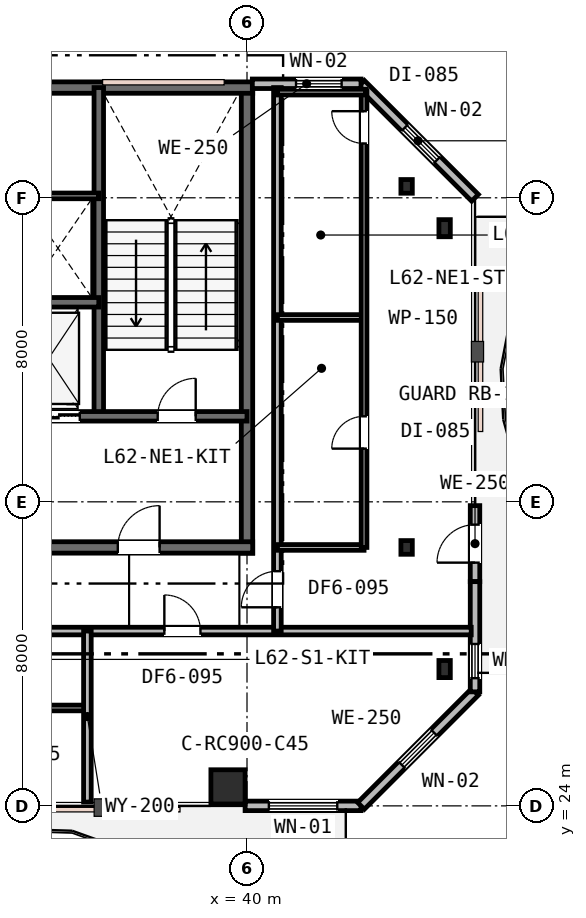
"""IFC4 building model, lengths in metres.
Left out: names, types, materials, properties, quantities, classifications, styles, units other than length and angle.
Written with IfcOpenShell. Run it as: python <this file> out.ifc"""

import sys

from ifc_helpers import new_model, si_unit, direction, frame, frame_2d, origin, origin_2d, place, context, subcontext, project, spatial, rectangle, i_section, extrude, element, fill, save


model = new_model("IFC4")
c1 = context("Model", 3, precision=1e-05, world=origin(), true_north=direction((0.0, 1.0)))
c2 = subcontext(c1, "Body", "Model", "MODEL_VIEW")
j1 = project(units=[si_unit("LENGTHUNIT", "METRE"), si_unit("PLANEANGLEUNIT", "RADIAN")], contexts=[c1])
p1 = place(None, origin())
s1 = spatial("IfcSite", under=j1, at=p1, CompositionType="ELEMENT")
p2 = place(p1, origin())
s2 = spatial("IfcBuilding", under=s1, at=p2, CompositionType="ELEMENT")
p3 = place(p2, frame((0.0, 0.0, 241.2)))
s3 = spatial("IfcBuildingStorey", under=s2, at=p3, CompositionType="ELEMENT", Elevation=241.2)
p4 = place(p3, frame((40.0, 30.65, 0.0), z_axis=(0.0, 0.0, 1.0), x_axis=(0.0, 1.0, 0.0)))
e1 = element("IfcWall", 1, at=p4, inside=s3, PredefinedType="SHEAR", context=c2, shape_type="SweptSolid", body=[
    extrude(rectangle(XDim=12.3, YDim=0.3, at=frame_2d((6.15, 0.0))), origin(), (0.0, 0.0, 1.0), 3.8),
])
p5 = place(p3, frame((15.85, 42.9, 0.0), z_axis=(0.0, 0.0, 1.0), x_axis=(1.0, 0.0, 0.0)))
e2 = element("IfcWall", 2, at=p5, inside=s3, PredefinedType="SHEAR", context=c2, shape_type="SweptSolid", body=[
    extrude(rectangle(XDim=24.3, YDim=0.3, at=frame_2d((12.15, 0.0))), origin(), (0.0, 0.0, 1.0), 3.8),
])
p6 = place(p3, frame((28.95, 30.8, 0.0), z_axis=(0.0, 0.0, 1.0), x_axis=(1.0, 0.0, 0.0)))
e3 = element("IfcWall", 3, at=p6, inside=s3, PredefinedType="SHEAR", context=c2, shape_type="SweptSolid", body=[
    extrude(rectangle(XDim=11.2, YDim=0.3, at=frame_2d((5.6, 0.0))), origin(), (0.0, 0.0, 1.0), 3.8),
])
p7 = place(p6, frame((7.65, 0.0, 0.0)))
e4 = element("IfcOpeningElement", 4, at=p7, cuts=e3, PredefinedType="OPENING", context=c2, shape_type="SweptSolid", body=[
    extrude(rectangle(XDim=1.1, YDim=2.15, at=frame_2d((0.55, 1.075))), frame((0.0, 0.16, 0.0), z_axis=(0.0, -1.0, 0.0), x_axis=(1.0, 0.0, 0.0)), (0.0, 0.0, 1.0), 0.32),
])
p8 = place(p3, frame((36.1, 34.25, 0.0), z_axis=(0.0, 0.0, 1.0), x_axis=(0.0, 1.0, 0.0)))
e5 = element("IfcWall", 5, at=p8, inside=s3, PredefinedType="SHEAR", context=c2, shape_type="SweptSolid", body=[
    extrude(rectangle(XDim=8.65, YDim=0.25, at=frame_2d((4.325, 0.0))), origin(), (0.0, 0.0, 1.0), 3.8),
])
p9 = place(p3, frame((33.95, 34.25, 0.0), z_axis=(0.0, 0.0, 1.0), x_axis=(1.0, 0.0, 0.0)))
e6 = element("IfcWall", 6, at=p9, inside=s3, PredefinedType="SHEAR", context=c2, shape_type="SweptSolid", body=[
    extrude(rectangle(XDim=6.05, YDim=0.25, at=frame_2d((3.025, 0.0))), origin(), (0.0, 0.0, 1.0), 3.8),
])
p10 = place(p9, frame((3.7, 0.0, 0.0)))
e7 = element("IfcOpeningElement", 7, at=p10, cuts=e6, PredefinedType="OPENING", context=c2, shape_type="SweptSolid", body=[
    extrude(rectangle(XDim=1.0, YDim=2.15, at=frame_2d((0.5, 1.075))), frame((0.0, 0.135, 0.0), z_axis=(0.0, -1.0, 0.0), x_axis=(1.0, 0.0, 0.0)), (0.0, 0.0, 1.0), 0.27),
])
p11 = place(p9, frame((0.55, 0.0, 0.0)))
e8 = element("IfcOpeningElement", 8, at=p11, cuts=e6, PredefinedType="OPENING", context=c2, shape_type="SweptSolid", body=[
    extrude(rectangle(XDim=1.1, YDim=2.15, at=frame_2d((0.55, 1.075))), frame((0.0, 0.135, 0.0), z_axis=(0.0, -1.0, 0.0), x_axis=(1.0, 0.0, 0.0)), (0.0, 0.0, 1.0), 0.27),
])
p12 = place(p3, frame((19.9, 37.25, 0.0), z_axis=(0.0, 0.0, 1.0), x_axis=(1.0, 0.0, 0.0)))
e9 = element("IfcWall", 9, at=p12, inside=s3, PredefinedType="SHEAR", context=c2, shape_type="SweptSolid", body=[
    extrude(rectangle(XDim=16.2, YDim=0.25, at=frame_2d((8.1, 0.0))), origin(), (0.0, 0.0, 1.0), 3.8),
])
p13 = place(p12, frame((12.55, 0.0, 0.0)))
e10 = element("IfcOpeningElement", 10, at=p13, cuts=e9, PredefinedType="OPENING", context=c2, shape_type="SweptSolid", body=[
    extrude(rectangle(XDim=0.9, YDim=2.15, at=frame_2d((0.45, 1.075))), frame((0.0, 0.135, 0.0), z_axis=(0.0, -1.0, 0.0), x_axis=(1.0, 0.0, 0.0)), (0.0, 0.0, 1.0), 0.27),
])
p14 = place(p12, frame((2.5, 0.0, 0.0)))
e11 = element("IfcOpeningElement", 11, at=p14, cuts=e9, PredefinedType="OPENING", context=c2, shape_type="SweptSolid", body=[
    extrude(rectangle(XDim=1.05, YDim=2.15, at=frame_2d((0.525, 1.075))), frame((0.0, 0.135, 0.0), z_axis=(0.0, -1.0, 0.0), x_axis=(1.0, 0.0, 0.0)), (0.0, 0.0, 1.0), 0.27),
])
p15 = place(p12, frame((4.4, 0.0, 0.0)))
e12 = element("IfcOpeningElement", 12, at=p15, cuts=e9, PredefinedType="OPENING", context=c2, shape_type="SweptSolid", body=[
    extrude(rectangle(XDim=1.05, YDim=2.15, at=frame_2d((0.525, 1.075))), frame((0.0, 0.135, 0.0), z_axis=(0.0, -1.0, 0.0), x_axis=(1.0, 0.0, 0.0)), (0.0, 0.0, 1.0), 0.27),
])
p16 = place(p12, frame((6.3, 0.0, 0.0)))
e13 = element("IfcOpeningElement", 13, at=p16, cuts=e9, PredefinedType="OPENING", context=c2, shape_type="SweptSolid", body=[
    extrude(rectangle(XDim=1.05, YDim=2.15, at=frame_2d((0.525, 1.075))), frame((0.0, 0.135, 0.0), z_axis=(0.0, -1.0, 0.0), x_axis=(1.0, 0.0, 0.0)), (0.0, 0.0, 1.0), 0.27),
])
p17 = place(p3, frame((39.5, 24.5, 0.0), z_axis=(0.0, 0.0, 1.0), x_axis=(1.0, 0.0, 0.0)))
e14 = element("IfcColumn", 14, at=p17, inside=s3, PredefinedType="COLUMN", context=c2, shape_type="SweptSolid", body=[
    extrude(rectangle(XDim=0.9, YDim=0.9, at=origin_2d()), origin(), (0.0, 0.0, 1.0), 3.8),
])
for number, where, z_axis, x_axis in (
    (15, (45.2, 27.6, 0.0), (0.0, 0.0, 1.0), (1.0, 0.0, 0.0)),
    (16, (45.2, 39.2, 0.0), (0.0, 0.0, 1.0), (1.0, 0.0, 0.0)),
):
    element("IfcColumn", number, at=place(p3, frame(where, z_axis=z_axis, x_axis=x_axis)), inside=s3, PredefinedType="COLUMN", context=c2, shape_type="SweptSolid", body=[
        extrude(i_section(OverallWidth=0.3, OverallDepth=0.45, WebThickness=0.014, FlangeThickness=0.026, FilletRadius=0.027, at=origin_2d()), origin(), (0.0, 0.0, 1.0), 3.8),
    ])
for number, where, z_axis, x_axis in (
    (17, (44.2, 30.8, 0.0), (0.0, 0.0, 1.0), (1.0, 0.0, 0.0)),
    (18, (44.2, 40.3, 0.0), (0.0, 0.0, 1.0), (1.0, 0.0, 0.0)),
):
    element("IfcColumn", number, at=place(p3, frame(where, z_axis=z_axis, x_axis=x_axis)), inside=s3, PredefinedType="COLUMN", context=c2, shape_type="SweptSolid", body=[
        extrude(i_section(OverallWidth=0.3, OverallDepth=0.36, WebThickness=0.013, FlangeThickness=0.022, FilletRadius=0.027, at=origin_2d()), origin(), (0.0, 0.0, 1.0), 3.8),
    ])
p18 = place(p3, frame((39.95, 24.0, 0.0), z_axis=(0.0, 0.0, 1.0), x_axis=(1.0, 0.0, 0.0)))
e19 = element("IfcWall", 19, at=p18, inside=s3, PredefinedType="STANDARD", context=c2, shape_type="SweptSolid", body=[
    extrude(rectangle(XDim=3.05, YDim=0.25, at=frame_2d((1.525, 0.0))), origin(), (0.0, 0.0, 1.0), 3.53),
])
p19 = place(p18, frame((0.625, 0.0, 0.75)))
e20 = element("IfcOpeningElement", 20, at=p19, cuts=e19, PredefinedType="OPENING", context=c2, shape_type="SweptSolid", body=[
    extrude(rectangle(XDim=1.8, YDim=1.85, at=frame_2d((0.9, 0.925))), frame((0.0, 0.135, 0.0), z_axis=(0.0, -1.0, 0.0), x_axis=(1.0, 0.0, 0.0)), (0.0, 0.0, 1.0), 0.27),
])
p20 = place(p3, frame((43.0, 24.0, 0.0), z_axis=(0.0, 0.0, 1.0), x_axis=(0.707106781187, 0.707106781187, 0.0)))
e21 = element("IfcWall", 21, at=p20, inside=s3, PredefinedType="STANDARD", context=c2, shape_type="SweptSolid", body=[
    extrude(rectangle(XDim=4.243, YDim=0.25, at=frame_2d((2.121, 0.0))), origin(), (0.0, 0.0, 1.0), 3.53),
])
p21 = place(p20, frame((1.521, 0.0, 0.85)))
e22 = element("IfcOpeningElement", 22, at=p21, cuts=e21, PredefinedType="OPENING", context=c2, shape_type="SweptSolid", body=[
    extrude(rectangle(XDim=1.2, YDim=1.6, at=frame_2d((0.6, 0.8))), frame((0.0, 0.135, 0.0), z_axis=(0.0, -1.0, 0.0), x_axis=(1.0, 0.0, 0.0)), (0.0, 0.0, 1.0), 0.27),
])
p22 = place(p3, frame((46.0, 29.9, 0.0), z_axis=(0.0, 0.0, 1.0), x_axis=(0.0, 1.0, 0.0)))
e23 = element("IfcWall", 23, at=p22, inside=s3, PredefinedType="STANDARD", context=c2, shape_type="SweptSolid", body=[
    extrude(rectangle(XDim=2.0, YDim=0.25, at=frame_2d((1.0, 0.0))), origin(), (0.0, 0.0, 1.0), 3.53),
])
p23 = place(p22, frame((0.5, 0.0, 0.0)))
e24 = element("IfcOpeningElement", 24, at=p23, cuts=e23, PredefinedType="OPENING", context=c2, shape_type="SweptSolid", body=[
    extrude(rectangle(XDim=1.0, YDim=2.15, at=frame_2d((0.5, 1.075))), frame((0.0, 0.135, 0.0), z_axis=(0.0, -1.0, 0.0), x_axis=(1.0, 0.0, 0.0)), (0.0, 0.0, 1.0), 0.27),
])
p24 = place(p3, frame((46.0, 27.0, 0.0), z_axis=(0.0, 0.0, 1.0), x_axis=(0.0, 1.0, 0.0)))
e25 = element("IfcWall", 25, at=p24, inside=s3, PredefinedType="STANDARD", context=c2, shape_type="SweptSolid", body=[
    extrude(rectangle(XDim=2.9, YDim=0.25, at=frame_2d((1.45, 0.0))), origin(), (0.0, 0.0, 1.0), 3.53),
])
p25 = place(p24, frame((0.36, 0.0, 0.9)))
e26 = element("IfcOpeningElement", 26, at=p25, cuts=e25, PredefinedType="OPENING", context=c2, shape_type="SweptSolid", body=[
    extrude(rectangle(XDim=0.9, YDim=1.55, at=frame_2d((0.45, 0.775))), frame((0.0, 0.135, 0.0), z_axis=(0.0, -1.0, 0.0), x_axis=(1.0, 0.0, 0.0)), (0.0, 0.0, 1.0), 0.27),
])
p26 = place(p3, frame((46.0, 40.0, 0.0), z_axis=(0.0, 0.0, 1.0), x_axis=(-0.707106781187, 0.707106781187, 0.0)))
e27 = element("IfcWall", 27, at=p26, inside=s3, PredefinedType="STANDARD", context=c2, shape_type="SweptSolid", body=[
    extrude(rectangle(XDim=4.243, YDim=0.25, at=frame_2d((2.121, 0.0))), origin(), (0.0, 0.0, 1.0), 3.53),
])
p27 = place(p26, frame((1.411, 0.0, 0.85)))
e28 = element("IfcOpeningElement", 28, at=p27, cuts=e27, PredefinedType="OPENING", context=c2, shape_type="SweptSolid", body=[
    extrude(rectangle(XDim=1.2, YDim=1.6, at=frame_2d((0.6, 0.8))), frame((0.0, 0.135, 0.0), z_axis=(0.0, -1.0, 0.0), x_axis=(1.0, 0.0, 0.0)), (0.0, 0.0, 1.0), 0.27),
])
p28 = place(p3, frame((43.0, 43.0, 0.0), z_axis=(0.0, 0.0, 1.0), x_axis=(-1.0, 0.0, 0.0)))
e29 = element("IfcWall", 29, at=p28, inside=s3, PredefinedType="STANDARD", context=c2, shape_type="SweptSolid", body=[
    extrude(rectangle(XDim=2.86, YDim=0.25, at=frame_2d((1.43, 0.0))), origin(), (0.0, 0.0, 1.0), 3.53),
])
p29 = place(p28, frame((0.51, 0.0, 0.85)))
e30 = element("IfcOpeningElement", 30, at=p29, cuts=e29, PredefinedType="OPENING", context=c2, shape_type="SweptSolid", body=[
    extrude(rectangle(XDim=1.2, YDim=1.6, at=frame_2d((0.6, 0.8))), frame((0.0, 0.135, 0.0), z_axis=(0.0, -1.0, 0.0), x_axis=(1.0, 0.0, 0.0)), (0.0, 0.0, 1.0), 0.27),
])
p30 = place(p3, frame((34.05, 40.05, 0.0), z_axis=(0.0, 0.0, 1.0), x_axis=(1.0, 0.0, 0.0)))
e31 = element("IfcWall", 31, at=p30, inside=s3, PredefinedType="PARTITIONING", context=c2, shape_type="SweptSolid", body=[
    extrude(rectangle(XDim=2.05, YDim=0.15, at=frame_2d((1.025, 0.0))), origin(), (0.0, 0.0, 1.0), 3.53),
])
p31 = place(p3, frame((11.6, 28.6, 0.0), z_axis=(0.0, 0.0, 1.0), x_axis=(1.0, 0.0, 0.0)))
e32 = element("IfcWall", 32, at=p31, inside=s3, PredefinedType="PARTITIONING", context=c2, shape_type="SweptSolid", body=[
    extrude(rectangle(XDim=34.3, YDim=0.2, at=frame_2d((17.15, 0.0))), origin(), (0.0, 0.0, 1.0), 3.16),
])
p32 = place(p31, frame((14.625, 0.0, 0.0)))
e33 = element("IfcOpeningElement", 33, at=p32, cuts=e32, PredefinedType="OPENING", context=c2, shape_type="SweptSolid", body=[
    extrude(rectangle(XDim=0.95, YDim=2.15, at=frame_2d((0.475, 1.075))), frame((0.0, 0.11, 0.0), z_axis=(0.0, -1.0, 0.0), x_axis=(1.0, 0.0, 0.0)), (0.0, 0.0, 1.0), 0.22),
])
p33 = place(p31, frame((26.225, 0.0, 0.0)))
e34 = element("IfcOpeningElement", 34, at=p33, cuts=e32, PredefinedType="OPENING", context=c2, shape_type="SweptSolid", body=[
    extrude(rectangle(XDim=0.95, YDim=2.15, at=frame_2d((0.475, 1.075))), frame((0.0, 0.11, 0.0), z_axis=(0.0, -1.0, 0.0), x_axis=(1.0, 0.0, 0.0)), (0.0, 0.0, 1.0), 0.22),
])
p34 = place(p3, frame((40.8, 28.6, 0.0), z_axis=(0.0, 0.0, 1.0), x_axis=(0.0, 1.0, 0.0)))
e35 = element("IfcWall", 35, at=p34, inside=s3, PredefinedType="PARTITIONING", context=c2, shape_type="SweptSolid", body=[
    extrude(rectangle(XDim=14.3, YDim=0.2, at=frame_2d((7.15, 0.0))), origin(), (0.0, 0.0, 1.0), 3.16),
])
p35 = place(p34, frame((0.625, 0.0, 0.0)))
e36 = element("IfcOpeningElement", 36, at=p35, cuts=e35, PredefinedType="OPENING", context=c2, shape_type="SweptSolid", body=[
    extrude(rectangle(XDim=0.95, YDim=2.15, at=frame_2d((0.475, 1.075))), frame((0.0, 0.11, 0.0), z_axis=(0.0, -1.0, 0.0), x_axis=(1.0, 0.0, 0.0)), (0.0, 0.0, 1.0), 0.22),
])
p36 = place(p3, frame((40.8, 30.8, 0.0), z_axis=(0.0, 0.0, 1.0), x_axis=(1.0, 0.0, 0.0)))
e37 = element("IfcWall", 37, at=p36, inside=s3, PredefinedType="PARTITIONING", context=c2, shape_type="SweptSolid", body=[
    extrude(rectangle(XDim=2.28, YDim=0.15, at=frame_2d((1.14, 0.0))), origin(), (0.0, 0.0, 1.0), 3.16),
])
p37 = place(p3, frame((40.8, 36.85, 0.0), z_axis=(0.0, 0.0, 1.0), x_axis=(1.0, 0.0, 0.0)))
e38 = element("IfcWall", 38, at=p37, inside=s3, PredefinedType="PARTITIONING", context=c2, shape_type="SweptSolid", body=[
    extrude(rectangle(XDim=2.28, YDim=0.15, at=frame_2d((1.14, 0.0))), origin(), (0.0, 0.0, 1.0), 3.53),
])
p38 = place(p3, frame((43.08, 30.8, 0.0), z_axis=(0.0, 0.0, 1.0), x_axis=(0.0, 1.0, 0.0)))
e39 = element("IfcWall", 39, at=p38, inside=s3, PredefinedType="PARTITIONING", context=c2, shape_type="SweptSolid", body=[
    extrude(rectangle(XDim=12.02, YDim=0.15, at=frame_2d((6.01, 0.0))), origin(), (0.0, 0.0, 1.0), 3.16),
])
p39 = place(p38, frame((2.6, 0.0, 0.0)))
e40 = element("IfcOpeningElement", 40, at=p39, cuts=e39, PredefinedType="OPENING", context=c2, shape_type="SweptSolid", body=[
    extrude(rectangle(XDim=0.85, YDim=2.15, at=frame_2d((0.425, 1.075))), frame((0.0, 0.085, 0.0), z_axis=(0.0, -1.0, 0.0), x_axis=(1.0, 0.0, 0.0)), (0.0, 0.0, 1.0), 0.17),
])
p40 = place(p38, frame((10.629, 0.0, 0.0)))
e41 = element("IfcOpeningElement", 41, at=p40, cuts=e39, PredefinedType="OPENING", context=c2, shape_type="SweptSolid", body=[
    extrude(rectangle(XDim=0.85, YDim=2.15, at=frame_2d((0.425, 1.075))), frame((0.0, 0.085, 0.0), z_axis=(0.0, -1.0, 0.0), x_axis=(1.0, 0.0, 0.0)), (0.0, 0.0, 1.0), 0.17),
])
p41 = place(p3, frame((40.8, 42.78, 0.0), z_axis=(0.0, 0.0, 1.0), x_axis=(1.0, 0.0, 0.0)))
e42 = element("IfcWall", 42, at=p41, inside=s3, PredefinedType="PARTITIONING", context=c2, shape_type="SweptSolid", body=[
    extrude(rectangle(XDim=2.32, YDim=0.15, at=frame_2d((1.16, 0.0))), origin(), (0.0, 0.0, 1.0), 3.53),
])
p42 = place(p3, frame((29.4, 26.576, 0.0), z_axis=(0.0, 0.0, 1.0), x_axis=(1.0, 0.0, 0.0)))
e43 = element("IfcWall", 43, at=p42, inside=s3, PredefinedType="PARTITIONING", context=c2, shape_type="SweptSolid", body=[
    extrude(rectangle(XDim=6.4, YDim=0.15, at=frame_2d((3.2, 0.0))), origin(), (0.0, 0.0, 1.0), 3.16),
])
p43 = place(p42, frame((0.445, 0.0, 0.0)))
e44 = element("IfcOpeningElement", 44, at=p43, cuts=e43, PredefinedType="OPENING", context=c2, shape_type="SweptSolid", body=[
    extrude(rectangle(XDim=0.85, YDim=2.15, at=frame_2d((0.425, 1.075))), frame((0.0, 0.085, 0.0), z_axis=(0.0, -1.0, 0.0), x_axis=(1.0, 0.0, 0.0)), (0.0, 0.0, 1.0), 0.17),
])
p44 = place(p42, frame((4.375, 0.0, 0.0)))
e45 = element("IfcOpeningElement", 45, at=p44, cuts=e43, PredefinedType="OPENING", context=c2, shape_type="SweptSolid", body=[
    extrude(rectangle(XDim=0.85, YDim=2.15, at=frame_2d((0.425, 1.075))), frame((0.0, 0.085, 0.0), z_axis=(0.0, -1.0, 0.0), x_axis=(1.0, 0.0, 0.0)), (0.0, 0.0, 1.0), 0.17),
])
p45 = place(p3, frame((35.8, 24.1, 0.0), z_axis=(0.0, 0.0, 1.0), x_axis=(0.0, 1.0, 0.0)))
e46 = element("IfcWall", 46, at=p45, inside=s3, PredefinedType="PARTITIONING", context=c2, shape_type="SweptSolid", body=[
    extrude(rectangle(XDim=4.5, YDim=0.2, at=frame_2d((2.25, 0.0))), origin(), (0.0, 0.0, 1.0), 3.27),
])
p46 = place(p19, origin())
e47 = element("IfcWindow", 47, at=p46, inside=s3, PartitioningType="SINGLE_PANEL", PredefinedType="WINDOW", context=c2, shape_type="SweptSolid", body=[
    extrude(rectangle(XDim=1.8, YDim=1.85, at=frame_2d((0.9, 0.925))), frame((0.0, 0.03, 0.0), z_axis=(0.0, -1.0, 0.0), x_axis=(1.0, 0.0, 0.0)), (0.0, 0.0, 1.0), 0.06),
])
fill(e20, e47)
p47 = place(p21, origin())
e48 = element("IfcWindow", 48, at=p47, inside=s3, PartitioningType="SINGLE_PANEL", PredefinedType="WINDOW", context=c2, shape_type="SweptSolid", body=[
    extrude(rectangle(XDim=1.2, YDim=1.6, at=frame_2d((0.6, 0.8))), frame((0.0, 0.03, 0.0), z_axis=(0.0, -1.0, 0.0), x_axis=(1.0, 0.0, 0.0)), (0.0, 0.0, 1.0), 0.06),
])
fill(e22, e48)
p48 = place(p23, origin())
e49 = element("IfcDoor", 49, at=p48, inside=s3, OperationType="SINGLE_SWING_LEFT", PredefinedType="DOOR", context=c2, shape_type="SweptSolid", body=[
    extrude(rectangle(XDim=1.0, YDim=2.15, at=frame_2d((0.5, 1.075))), frame((0.0, 0.025, 0.0), z_axis=(0.0, -1.0, 0.0), x_axis=(1.0, 0.0, 0.0)), (0.0, 0.0, 1.0), 0.05),
])
fill(e24, e49)
p49 = place(p25, origin())
e50 = element("IfcWindow", 50, at=p49, inside=s3, PartitioningType="SINGLE_PANEL", PredefinedType="WINDOW", context=c2, shape_type="SweptSolid", body=[
    extrude(rectangle(XDim=0.9, YDim=1.55, at=frame_2d((0.45, 0.775))), frame((0.0, 0.03, 0.0), z_axis=(0.0, -1.0, 0.0), x_axis=(1.0, 0.0, 0.0)), (0.0, 0.0, 1.0), 0.06),
])
fill(e26, e50)
p50 = place(p27, origin())
e51 = element("IfcWindow", 51, at=p50, inside=s3, PartitioningType="SINGLE_PANEL", PredefinedType="WINDOW", context=c2, shape_type="SweptSolid", body=[
    extrude(rectangle(XDim=1.2, YDim=1.6, at=frame_2d((0.6, 0.8))), frame((0.0, 0.03, 0.0), z_axis=(0.0, -1.0, 0.0), x_axis=(1.0, 0.0, 0.0)), (0.0, 0.0, 1.0), 0.06),
])
fill(e28, e51)
p51 = place(p29, origin())
e52 = element("IfcWindow", 52, at=p51, inside=s3, PartitioningType="SINGLE_PANEL", PredefinedType="WINDOW", context=c2, shape_type="SweptSolid", body=[
    extrude(rectangle(XDim=1.2, YDim=1.6, at=frame_2d((0.6, 0.8))), frame((0.0, 0.03, 0.0), z_axis=(0.0, -1.0, 0.0), x_axis=(1.0, 0.0, 0.0)), (0.0, 0.0, 1.0), 0.06),
])
fill(e30, e52)
p52 = place(p10, origin())
e53 = element("IfcDoor", 53, at=p52, inside=s3, OperationType="SINGLE_SWING_RIGHT", PredefinedType="DOOR", context=c2, shape_type="SweptSolid", body=[
    extrude(rectangle(XDim=1.0, YDim=2.15, at=frame_2d((0.5, 1.075))), frame((0.0, 0.025, 0.0), z_axis=(0.0, -1.0, 0.0), x_axis=(1.0, 0.0, 0.0)), (0.0, 0.0, 1.0), 0.05),
])
fill(e7, e53)
p53 = place(p7, origin())
e54 = element("IfcDoor", 54, at=p53, inside=s3, OperationType="SINGLE_SWING_RIGHT", PredefinedType="DOOR", context=c2, shape_type="SweptSolid", body=[
    extrude(rectangle(XDim=1.1, YDim=2.15, at=frame_2d((0.55, 1.075))), frame((0.0, 0.025, 0.0), z_axis=(0.0, -1.0, 0.0), x_axis=(1.0, 0.0, 0.0)), (0.0, 0.0, 1.0), 0.05),
])
fill(e4, e54)
p54 = place(p35, origin())
e55 = element("IfcDoor", 55, at=p54, inside=s3, OperationType="SINGLE_SWING_LEFT", PredefinedType="DOOR", context=c2, shape_type="SweptSolid", body=[
    extrude(rectangle(XDim=0.95, YDim=2.15, at=frame_2d((0.475, 1.075))), frame((0.0, 0.025, 0.0), z_axis=(0.0, -1.0, 0.0), x_axis=(1.0, 0.0, 0.0)), (0.0, 0.0, 1.0), 0.05),
])
fill(e36, e55)
p55 = place(p39, origin())
e56 = element("IfcDoor", 56, at=p55, inside=s3, OperationType="SINGLE_SWING_LEFT", PredefinedType="DOOR", context=c2, shape_type="SweptSolid", body=[
    extrude(rectangle(XDim=0.85, YDim=2.15, at=frame_2d((0.425, 1.075))), frame((0.0, 0.025, 0.0), z_axis=(0.0, -1.0, 0.0), x_axis=(1.0, 0.0, 0.0)), (0.0, 0.0, 1.0), 0.05),
])
fill(e40, e56)
p56 = place(p40, origin())
e57 = element("IfcDoor", 57, at=p56, inside=s3, OperationType="SINGLE_SWING_RIGHT", PredefinedType="DOOR", context=c2, shape_type="SweptSolid", body=[
    extrude(rectangle(XDim=0.85, YDim=2.15, at=frame_2d((0.425, 1.075))), frame((0.0, 0.025, 0.0), z_axis=(0.0, -1.0, 0.0), x_axis=(1.0, 0.0, 0.0)), (0.0, 0.0, 1.0), 0.05),
])
fill(e41, e57)
p57 = place(p33, origin())
e58 = element("IfcDoor", 58, at=p57, inside=s3, OperationType="SINGLE_SWING_LEFT", PredefinedType="DOOR", context=c2, shape_type="SweptSolid", body=[
    extrude(rectangle(XDim=0.95, YDim=2.15, at=frame_2d((0.475, 1.075))), frame((0.0, 0.025, 0.0), z_axis=(0.0, -1.0, 0.0), x_axis=(1.0, 0.0, 0.0)), (0.0, 0.0, 1.0), 0.05),
])
fill(e34, e58)
p58 = place(p11, origin())
e59 = element("IfcDoor", 59, at=p58, inside=s3, OperationType="DOUBLE_DOOR_SLIDING", PredefinedType="DOOR", context=c2, shape_type="SweptSolid", body=[
    extrude(rectangle(XDim=1.1, YDim=2.15, at=frame_2d((0.55, 1.075))), frame((0.0, 0.025, 0.0), z_axis=(0.0, -1.0, 0.0), x_axis=(1.0, 0.0, 0.0)), (0.0, 0.0, 1.0), 0.05),
])
fill(e8, e59)
save(model, sys.argv[1])
